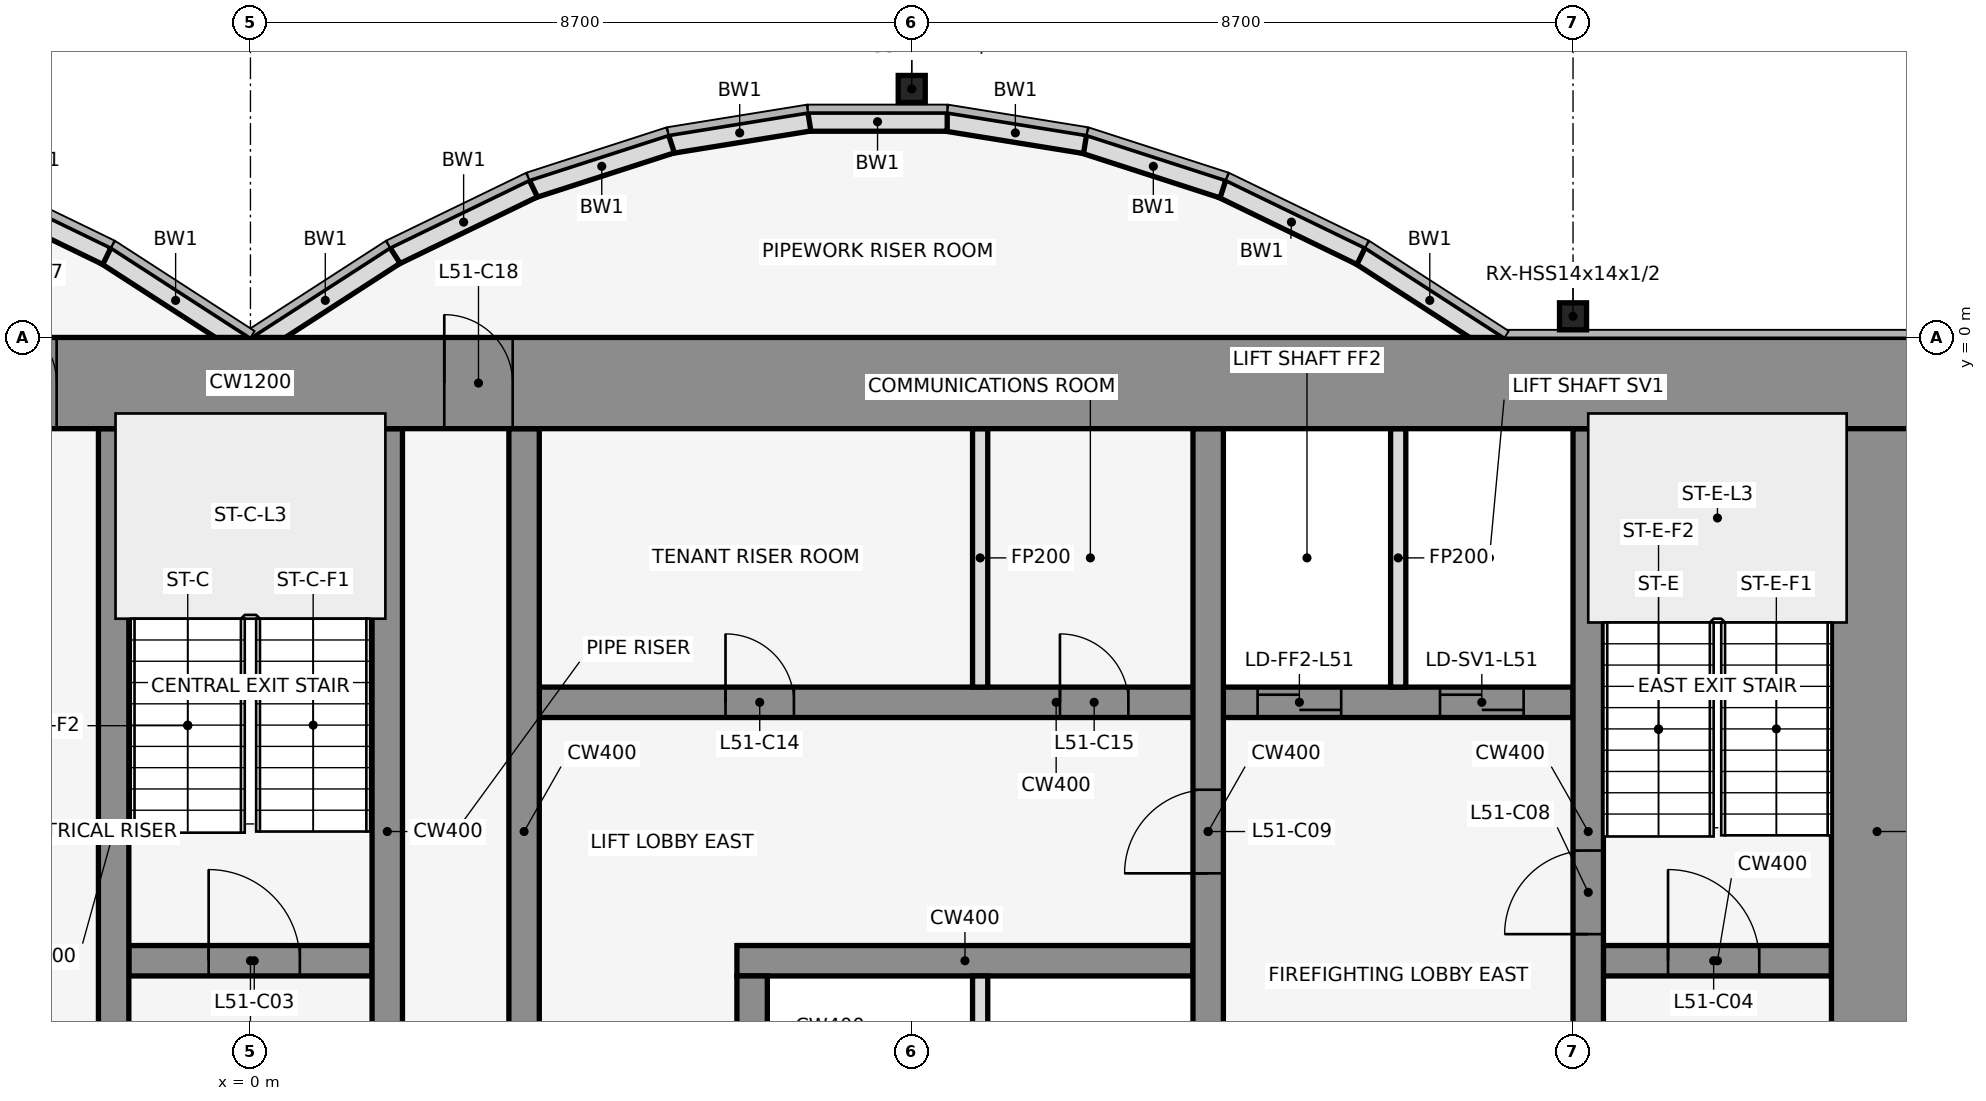
"""IFC4 building model, lengths in metres.
Left out: names, types, materials, properties, quantities, classifications, styles, units other than length and angle.
Written with IfcOpenShell. Run it as: python <this file> out.ifc"""

import sys

from ifc_helpers import new_model, si_unit, direction, frame, frame_2d, origin, origin_2d, place, context, subcontext, project, spatial, rectangle, hollow_rectangle, extrude, element, fill, save


model = new_model("IFC4")
c1 = context("Model", 3, precision=1e-05, world=origin(), true_north=direction((0.0, 1.0)))
c2 = subcontext(c1, "Body", "Model", "MODEL_VIEW")
j1 = project(units=[si_unit("LENGTHUNIT", "METRE"), si_unit("PLANEANGLEUNIT", "RADIAN")], contexts=[c1])
p1 = place(None, origin())
s1 = spatial("IfcSite", under=j1, at=p1, CompositionType="ELEMENT")
p2 = place(p1, origin())
s2 = spatial("IfcBuilding", under=s1, at=p2, CompositionType="ELEMENT")
p3 = place(p2, frame((0.0, 0.0, 227.8)))
s3 = spatial("IfcBuildingStorey", under=s2, at=p3, CompositionType="ELEMENT", Elevation=227.8)
for number, where, z_axis, x_axis in (
    (1, (8.7, 3.269, 0.0), (0.0, 0.0, 1.0), (1.0, 0.0, 0.0)),
    (2, (17.4, 0.278, 0.0), (0.0, 0.0, 1.0), (1.0, 0.0, 0.0)),
):
    element("IfcColumn", number, at=place(p3, frame(where, z_axis=z_axis, x_axis=x_axis)), inside=s3, PredefinedType="COLUMN", context=c2, shape_type="SweptSolid", body=[
        extrude(hollow_rectangle(XDim=0.356, YDim=0.356, WallThickness=0.012, at=origin_2d()), origin(), (0.0, 0.0, 1.0), 4.1),
    ])
p4 = place(p3, frame((16.432, -0.105, 0.0), z_axis=(0.0, 0.0, 1.0), x_axis=(-0.83981312244, 0.542875602121, 0.0)))
e3 = element("IfcWall", 3, at=p4, inside=s3, PredefinedType="STANDARD", context=c2, shape_type="SweptSolid", body=[
    extrude(rectangle(XDim=2.183, YDim=0.25, at=frame_2d((1.091, 0.0))), origin(), (0.0, 0.0, 1.0), 3.95),
])
p5 = place(p3, frame((14.612, 1.073, 0.0), z_axis=(0.0, 0.0, 1.0), x_axis=(-0.89982408427, 0.436252928206, 0.0)))
e4 = element("IfcWall", 4, at=p5, inside=s3, PredefinedType="STANDARD", context=c2, shape_type="SweptSolid", body=[
    extrude(rectangle(XDim=2.038, YDim=0.25, at=frame_2d((1.019, 0.0))), origin(), (0.0, 0.0, 1.0), 3.95),
])
p6 = place(p3, frame((12.795, 1.955, 0.0), z_axis=(0.0, 0.0, 1.0), x_axis=(-0.951495806175, 0.307661714928, 0.0)))
e5 = element("IfcWall", 5, at=p6, inside=s3, PredefinedType="STANDARD", context=c2, shape_type="SweptSolid", body=[
    extrude(rectangle(XDim=1.927, YDim=0.25, at=frame_2d((0.963, 0.0))), origin(), (0.0, 0.0, 1.0), 3.95),
])
p7 = place(p3, frame((10.98, 2.543, 0.0), z_axis=(0.0, 0.0, 1.0), x_axis=(-0.987181718931, 0.159600293885, 0.0)))
e6 = element("IfcWall", 6, at=p7, inside=s3, PredefinedType="STANDARD", context=c2, shape_type="SweptSolid", body=[
    extrude(rectangle(XDim=1.857, YDim=0.25, at=frame_2d((0.929, 0.0))), origin(), (0.0, 0.0, 1.0), 3.95),
])
p8 = place(p3, frame((9.167, 2.838, 0.0), z_axis=(0.0, 0.0, 1.0), x_axis=(-1.0, 0.0, 0.0)))
e7 = element("IfcWall", 7, at=p8, inside=s3, PredefinedType="STANDARD", context=c2, shape_type="SweptSolid", body=[
    extrude(rectangle(XDim=1.833, YDim=0.25, at=frame_2d((0.917, 0.0))), origin(), (0.0, 0.0, 1.0), 3.95),
])
p9 = place(p3, frame((7.353, 2.84, 0.0), z_axis=(0.0, 0.0, 1.0), x_axis=(-0.987181718931, -0.159600293885, 0.0)))
e8 = element("IfcWall", 8, at=p9, inside=s3, PredefinedType="STANDARD", context=c2, shape_type="SweptSolid", body=[
    extrude(rectangle(XDim=1.857, YDim=0.25, at=frame_2d((0.929, 0.0))), origin(), (0.0, 0.0, 1.0), 3.95),
])
p10 = place(p3, frame((5.538, 2.548, 0.0), z_axis=(0.0, 0.0, 1.0), x_axis=(-0.951495806175, -0.307661714928, 0.0)))
e9 = element("IfcWall", 9, at=p10, inside=s3, PredefinedType="STANDARD", context=c2, shape_type="SweptSolid", body=[
    extrude(rectangle(XDim=1.927, YDim=0.25, at=frame_2d((0.963, 0.0))), origin(), (0.0, 0.0, 1.0), 3.95),
])
p11 = place(p3, frame((3.721, 1.962, 0.0), z_axis=(0.0, 0.0, 1.0), x_axis=(-0.89982408427, -0.436252928206, 0.0)))
e10 = element("IfcWall", 10, at=p11, inside=s3, PredefinedType="STANDARD", context=c2, shape_type="SweptSolid", body=[
    extrude(rectangle(XDim=2.038, YDim=0.25, at=frame_2d((1.019, 0.0))), origin(), (0.0, 0.0, 1.0), 3.95),
])
for number, where, z_axis, x_axis in (
    (11, (1.901, 1.08, 0.0), (0.0, 0.0, 1.0), (-0.84, -0.543, 0.0)),
    (12, (-0.068, -0.105, 0.0), (0.0, 0.0, 1.0), (-0.84, 0.543, 0.0)),
):
    element("IfcWall", number, at=place(p3, frame(where, z_axis=z_axis, x_axis=x_axis)), inside=s3, PredefinedType="STANDARD", context=c2, shape_type="SweptSolid", body=[
        extrude(rectangle(XDim=2.183, YDim=0.25, at=frame_2d((1.091, 0.0))), origin(), (0.0, 0.0, 1.0), 3.95),
    ])
p12 = place(p3, frame((-1.888, 1.073, 0.0), z_axis=(0.0, 0.0, 1.0), x_axis=(-0.89982408427, 0.436252928206, 0.0)))
e13 = element("IfcWall", 13, at=p12, inside=s3, PredefinedType="STANDARD", context=c2, shape_type="SweptSolid", body=[
    extrude(rectangle(XDim=2.038, YDim=0.25, at=frame_2d((1.019, 0.0))), origin(), (0.0, 0.0, 1.0), 3.95),
])
p13 = place(p3, frame((-1.6, -8.2, 0.0), z_axis=(0.0, 0.0, 1.0), x_axis=(1.0, 0.0, 0.0)))
e14 = element("IfcWall", 14, at=p13, inside=s3, PredefinedType="SHEAR", context=c2, shape_type="SweptSolid", body=[
    extrude(rectangle(XDim=3.2, YDim=0.4, at=frame_2d((1.6, 0.0))), origin(), (0.0, 0.0, 1.0), 4.1),
])
p14 = place(p13, frame((1.05, 0.0, 0.0)))
e15 = element("IfcOpeningElement", 15, at=p14, cuts=e14, PredefinedType="OPENING", context=c2, shape_type="SweptSolid", body=[
    extrude(rectangle(XDim=1.2, YDim=2.1, at=frame_2d((0.6, 1.05))), frame((0.0, 0.212, 0.0), z_axis=(0.0, -1.0, 0.0), x_axis=(1.0, 0.0, 0.0)), (0.0, 0.0, 1.0), 0.424),
])
p15 = place(p3, frame((6.4, -8.2, 0.0), z_axis=(0.0, 0.0, 1.0), x_axis=(1.0, 0.0, 0.0)))
e16 = element("IfcWall", 16, at=p15, inside=s3, PredefinedType="SHEAR", context=c2, shape_type="SweptSolid", body=[
    extrude(rectangle(XDim=6.0, YDim=0.4, at=frame_2d((3.0, 0.0))), origin(), (0.0, 0.0, 1.0), 4.1),
])
p16 = place(p3, frame((17.8, -8.2, 0.0), z_axis=(0.0, 0.0, 1.0), x_axis=(1.0, 0.0, 0.0)))
e17 = element("IfcWall", 17, at=p16, inside=s3, PredefinedType="SHEAR", context=c2, shape_type="SweptSolid", body=[
    extrude(rectangle(XDim=3.0, YDim=0.4, at=frame_2d((1.5, 0.0))), origin(), (0.0, 0.0, 1.0), 4.1),
])
p17 = place(p16, frame((0.85, 0.0, 0.0)))
e18 = element("IfcOpeningElement", 18, at=p17, cuts=e17, PredefinedType="OPENING", context=c2, shape_type="SweptSolid", body=[
    extrude(rectangle(XDim=1.2, YDim=2.1, at=frame_2d((0.6, 1.05))), frame((0.0, 0.212, 0.0), z_axis=(0.0, -1.0, 0.0), x_axis=(1.0, 0.0, 0.0)), (0.0, 0.0, 1.0), 0.424),
])
p18 = place(p3, frame((3.8, -4.8, 0.0), z_axis=(0.0, 0.0, 1.0), x_axis=(1.0, 0.0, 0.0)))
e19 = element("IfcWall", 19, at=p18, inside=s3, PredefinedType="SHEAR", context=c2, shape_type="SweptSolid", body=[
    extrude(rectangle(XDim=13.6, YDim=0.4, at=frame_2d((6.8, 0.0))), origin(), (0.0, 0.0, 1.0), 4.1),
])
p19 = place(p18, frame((9.45, 0.0, 0.0)))
e20 = element("IfcOpeningElement", 20, at=p19, cuts=e19, PredefinedType="OPENING", context=c2, shape_type="SweptSolid", body=[
    extrude(rectangle(XDim=1.1, YDim=2.1, at=frame_2d((0.55, 1.05))), frame((0.0, 0.212, 0.0), z_axis=(0.0, -1.0, 0.0), x_axis=(1.0, 0.0, 0.0)), (0.0, 0.0, 1.0), 0.424),
])
p20 = place(p18, frame((11.85, 0.0, 0.0)))
e21 = element("IfcOpeningElement", 21, at=p20, cuts=e19, PredefinedType="OPENING", context=c2, shape_type="SweptSolid", body=[
    extrude(rectangle(XDim=1.1, YDim=2.1, at=frame_2d((0.55, 1.05))), frame((0.0, 0.212, 0.0), z_axis=(0.0, -1.0, 0.0), x_axis=(1.0, 0.0, 0.0)), (0.0, 0.0, 1.0), 0.424),
])
p21 = place(p18, frame((2.45, 0.0, 0.0)))
e22 = element("IfcOpeningElement", 22, at=p21, cuts=e19, PredefinedType="OPENING", context=c2, shape_type="SweptSolid", body=[
    extrude(rectangle(XDim=0.9, YDim=2.1, at=frame_2d((0.45, 1.05))), frame((0.0, 0.212, 0.0), z_axis=(0.0, -1.0, 0.0), x_axis=(1.0, 0.0, 0.0)), (0.0, 0.0, 1.0), 0.424),
])
p22 = place(p18, frame((6.85, 0.0, 0.0)))
e23 = element("IfcOpeningElement", 23, at=p22, cuts=e19, PredefinedType="OPENING", context=c2, shape_type="SweptSolid", body=[
    extrude(rectangle(XDim=0.9, YDim=2.1, at=frame_2d((0.45, 1.05))), frame((0.0, 0.212, 0.0), z_axis=(0.0, -1.0, 0.0), x_axis=(1.0, 0.0, 0.0)), (0.0, 0.0, 1.0), 0.424),
])
for number, where, z_axis, x_axis in (
    (24, (-1.8, -11.8, 0.0), (0.0, 0.0, 1.0), (0.0, 1.0, 0.0)),
    (25, (1.8, -11.8, 0.0), (0.0, 0.0, 1.0), (0.0, 1.0, 0.0)),
):
    element("IfcWall", number, at=place(p3, frame(where, z_axis=z_axis, x_axis=x_axis)), inside=s3, PredefinedType="SHEAR", context=c2, shape_type="SweptSolid", body=[
        extrude(rectangle(XDim=10.6, YDim=0.4, at=frame_2d((5.3, 0.0))), origin(), (0.0, 0.0, 1.0), 4.1),
    ])
p23 = place(p3, frame((3.6, -11.8, 0.0), z_axis=(0.0, 0.0, 1.0), x_axis=(0.0, 1.0, 0.0)))
e26 = element("IfcWall", 26, at=p23, inside=s3, PredefinedType="SHEAR", context=c2, shape_type="SweptSolid", body=[
    extrude(rectangle(XDim=10.6, YDim=0.4, at=frame_2d((5.3, 0.0))), origin(), (0.0, 0.0, 1.0), 4.1),
])
p24 = place(p23, frame((1.35, 0.0, 0.0)))
e27 = element("IfcOpeningElement", 27, at=p24, cuts=e26, PredefinedType="OPENING", context=c2, shape_type="SweptSolid", body=[
    extrude(rectangle(XDim=0.9, YDim=2.1, at=frame_2d((0.45, 1.05))), frame((0.0, 0.212, 0.0), z_axis=(0.0, -1.0, 0.0), x_axis=(1.0, 0.0, 0.0)), (0.0, 0.0, 1.0), 0.424),
])
p25 = place(p3, frame((6.6, -11.8, 0.0), z_axis=(0.0, 0.0, 1.0), x_axis=(0.0, 1.0, 0.0)))
e28 = element("IfcWall", 28, at=p25, inside=s3, PredefinedType="SHEAR", context=c2, shape_type="SweptSolid", body=[
    extrude(rectangle(XDim=3.4, YDim=0.4, at=frame_2d((1.7, 0.0))), origin(), (0.0, 0.0, 1.0), 4.1),
])
for number, where, z_axis, x_axis in (
    (29, (9.6, -11.8, 0.0), (0.0, 0.0, 1.0), (0.0, 1.0, 0.0)),
    (30, (9.6, -4.6, 0.0), (0.0, 0.0, 1.0), (0.0, 1.0, 0.0)),
):
    element("IfcWall", number, at=place(p3, frame(where, z_axis=z_axis, x_axis=x_axis)), inside=s3, PredefinedType="PARTITIONING", context=c2, shape_type="SweptSolid", body=[
        extrude(rectangle(XDim=3.4, YDim=0.2, at=frame_2d((1.7, 0.0))), origin(), (0.0, 0.0, 1.0), 2.84),
    ])
p26 = place(p3, frame((12.6, -11.8, 0.0), z_axis=(0.0, 0.0, 1.0), x_axis=(0.0, 1.0, 0.0)))
e31 = element("IfcWall", 31, at=p26, inside=s3, PredefinedType="SHEAR", context=c2, shape_type="SweptSolid", body=[
    extrude(rectangle(XDim=10.6, YDim=0.4, at=frame_2d((5.3, 0.0))), origin(), (0.0, 0.0, 1.0), 4.1),
])
p27 = place(p26, frame((1.25, 0.0, 0.0)))
e32 = element("IfcOpeningElement", 32, at=p27, cuts=e31, PredefinedType="OPENING", context=c2, shape_type="SweptSolid", body=[
    extrude(rectangle(XDim=1.2, YDim=2.1, at=frame_2d((0.6, 1.05))), frame((0.0, 0.212, 0.0), z_axis=(0.0, -1.0, 0.0), x_axis=(1.0, 0.0, 0.0)), (0.0, 0.0, 1.0), 0.424),
])
p28 = place(p26, frame((4.75, 0.0, 0.0)))
e33 = element("IfcOpeningElement", 33, at=p28, cuts=e31, PredefinedType="OPENING", context=c2, shape_type="SweptSolid", body=[
    extrude(rectangle(XDim=1.1, YDim=2.1, at=frame_2d((0.55, 1.05))), frame((0.0, 0.212, 0.0), z_axis=(0.0, -1.0, 0.0), x_axis=(1.0, 0.0, 0.0)), (0.0, 0.0, 1.0), 0.424),
])
p29 = place(p3, frame((15.1, -4.6, 0.0), z_axis=(0.0, 0.0, 1.0), x_axis=(0.0, 1.0, 0.0)))
e34 = element("IfcWall", 34, at=p29, inside=s3, PredefinedType="PARTITIONING", context=c2, shape_type="SweptSolid", body=[
    extrude(rectangle(XDim=3.4, YDim=0.2, at=frame_2d((1.7, 0.0))), origin(), (0.0, 0.0, 1.0), 2.84),
])
p30 = place(p3, frame((17.6, -11.8, 0.0), z_axis=(0.0, 0.0, 1.0), x_axis=(0.0, 1.0, 0.0)))
e35 = element("IfcWall", 35, at=p30, inside=s3, PredefinedType="SHEAR", context=c2, shape_type="SweptSolid", body=[
    extrude(rectangle(XDim=10.6, YDim=0.4, at=frame_2d((5.3, 0.0))), origin(), (0.0, 0.0, 1.0), 4.1),
])
p31 = place(p30, frame((1.25, 0.0, 0.0)))
e36 = element("IfcOpeningElement", 36, at=p31, cuts=e35, PredefinedType="OPENING", context=c2, shape_type="SweptSolid", body=[
    extrude(rectangle(XDim=1.1, YDim=2.1, at=frame_2d((0.55, 1.05))), frame((0.0, 0.212, 0.0), z_axis=(0.0, -1.0, 0.0), x_axis=(1.0, 0.0, 0.0)), (0.0, 0.0, 1.0), 0.424),
])
p32 = place(p30, frame((3.95, 0.0, 0.0)))
e37 = element("IfcOpeningElement", 37, at=p32, cuts=e35, PredefinedType="OPENING", context=c2, shape_type="SweptSolid", body=[
    extrude(rectangle(XDim=1.1, YDim=2.1, at=frame_2d((0.55, 1.05))), frame((0.0, 0.212, 0.0), z_axis=(0.0, -1.0, 0.0), x_axis=(1.0, 0.0, 0.0)), (0.0, 0.0, 1.0), 0.424),
])
p33 = place(p3, frame((-22.0, -0.6, 0.0), z_axis=(0.0, 0.0, 1.0), x_axis=(1.0, 0.0, 0.0)))
e38 = element("IfcWall", 38, at=p33, inside=s3, PredefinedType="SHEAR", context=c2, shape_type="SweptSolid", body=[
    extrude(rectangle(XDim=44.0, YDim=1.2, at=frame_2d((22.0, 0.0))), origin(), (0.0, 0.0, 1.0), 4.1),
])
p34 = place(p33, frame((18.55, 0.0, 0.0)))
e39 = element("IfcOpeningElement", 39, at=p34, cuts=e38, PredefinedType="OPENING", context=c2, shape_type="SweptSolid", body=[
    extrude(rectangle(XDim=0.9, YDim=2.1, at=frame_2d((0.45, 1.05))), frame((0.0, 0.612, 0.0), z_axis=(0.0, -1.0, 0.0), x_axis=(1.0, 0.0, 0.0)), (0.0, 0.0, 1.0), 1.224),
])
p35 = place(p33, frame((24.55, 0.0, 0.0)))
e40 = element("IfcOpeningElement", 40, at=p35, cuts=e38, PredefinedType="OPENING", context=c2, shape_type="SweptSolid", body=[
    extrude(rectangle(XDim=0.9, YDim=2.1, at=frame_2d((0.45, 1.05))), frame((0.0, 0.612, 0.0), z_axis=(0.0, -1.0, 0.0), x_axis=(1.0, 0.0, 0.0)), (0.0, 0.0, 1.0), 1.224),
])
p36 = place(p3, frame((21.4, -11.8, 0.0), z_axis=(0.0, 0.0, 1.0), x_axis=(0.0, 1.0, 0.0)))
e41 = element("IfcWall", 41, at=p36, inside=s3, PredefinedType="SHEAR", context=c2, shape_type="SweptSolid", body=[
    extrude(rectangle(XDim=10.6, YDim=1.2, at=frame_2d((5.3, 0.0))), origin(), (0.0, 0.0, 1.0), 4.1),
])
p37 = place(p14, origin())
e42 = element("IfcDoor", 42, at=p37, inside=s3, OperationType="SINGLE_SWING_LEFT", PredefinedType="DOOR", context=c2, shape_type="SweptSolid", body=[
    extrude(rectangle(XDim=1.2, YDim=2.1, at=frame_2d((0.6, 1.05))), frame((0.0, 0.025, 0.0), z_axis=(0.0, -1.0, 0.0), x_axis=(1.0, 0.0, 0.0)), (0.0, 0.0, 1.0), 0.05),
])
fill(e15, e42)
p38 = place(p17, origin())
e43 = element("IfcDoor", 43, at=p38, inside=s3, OperationType="SINGLE_SWING_RIGHT", PredefinedType="DOOR", context=c2, shape_type="SweptSolid", body=[
    extrude(rectangle(XDim=1.2, YDim=2.1, at=frame_2d((0.6, 1.05))), frame((0.0, 0.025, 0.0), z_axis=(0.0, -1.0, 0.0), x_axis=(1.0, 0.0, 0.0)), (0.0, 0.0, 1.0), 0.05),
])
fill(e18, e43)
p39 = place(p19, origin())
e44 = element("IfcDoor", 44, at=p39, inside=s3, OperationType="DOUBLE_DOOR_SLIDING", PredefinedType="DOOR", context=c2, shape_type="SweptSolid", body=[
    extrude(rectangle(XDim=1.1, YDim=2.1, at=frame_2d((0.55, 1.05))), frame((0.0, 0.025, 0.0), z_axis=(0.0, -1.0, 0.0), x_axis=(1.0, 0.0, 0.0)), (0.0, 0.0, 1.0), 0.05),
])
fill(e20, e44)
p40 = place(p20, origin())
e45 = element("IfcDoor", 45, at=p40, inside=s3, OperationType="DOUBLE_DOOR_SLIDING", PredefinedType="DOOR", context=c2, shape_type="SweptSolid", body=[
    extrude(rectangle(XDim=1.1, YDim=2.1, at=frame_2d((0.55, 1.05))), frame((0.0, 0.025, 0.0), z_axis=(0.0, -1.0, 0.0), x_axis=(1.0, 0.0, 0.0)), (0.0, 0.0, 1.0), 0.05),
])
fill(e21, e45)
p41 = place(p32, origin())
e46 = element("IfcDoor", 46, at=p41, inside=s3, OperationType="SINGLE_SWING_RIGHT", PredefinedType="DOOR", context=c2, shape_type="SweptSolid", body=[
    extrude(rectangle(XDim=1.1, YDim=2.1, at=frame_2d((0.55, 1.05))), frame((0.0, 0.025, 0.0), z_axis=(0.0, -1.0, 0.0), x_axis=(1.0, 0.0, 0.0)), (0.0, 0.0, 1.0), 0.05),
])
fill(e37, e46)
p42 = place(p28, frame((1.1, 0.0, 0.0), z_axis=(0.0, 0.0, 1.0), x_axis=(-1.0, 0.0, 0.0)))
e47 = element("IfcDoor", 47, at=p42, inside=s3, OperationType="SINGLE_SWING_RIGHT", PredefinedType="DOOR", context=c2, shape_type="SweptSolid", body=[
    extrude(rectangle(XDim=1.1, YDim=2.1, at=frame_2d((0.55, 1.05))), frame((0.0, 0.025, 0.0), z_axis=(0.0, -1.0, 0.0), x_axis=(1.0, 0.0, 0.0)), (0.0, 0.0, 1.0), 0.05),
])
fill(e33, e47)
p43 = place(p21, origin())
e48 = element("IfcDoor", 48, at=p43, inside=s3, OperationType="SINGLE_SWING_RIGHT", PredefinedType="DOOR", context=c2, shape_type="SweptSolid", body=[
    extrude(rectangle(XDim=0.9, YDim=2.1, at=frame_2d((0.45, 1.05))), frame((0.0, 0.025, 0.0), z_axis=(0.0, -1.0, 0.0), x_axis=(1.0, 0.0, 0.0)), (0.0, 0.0, 1.0), 0.05),
])
fill(e22, e48)
p44 = place(p22, origin())
e49 = element("IfcDoor", 49, at=p44, inside=s3, OperationType="SINGLE_SWING_LEFT", PredefinedType="DOOR", context=c2, shape_type="SweptSolid", body=[
    extrude(rectangle(XDim=0.9, YDim=2.1, at=frame_2d((0.45, 1.05))), frame((0.0, 0.025, 0.0), z_axis=(0.0, -1.0, 0.0), x_axis=(1.0, 0.0, 0.0)), (0.0, 0.0, 1.0), 0.05),
])
fill(e23, e49)
p45 = place(p34, origin())
e50 = element("IfcDoor", 50, at=p45, inside=s3, OperationType="SINGLE_SWING_LEFT", PredefinedType="DOOR", context=c2, shape_type="SweptSolid", body=[
    extrude(rectangle(XDim=0.9, YDim=2.1, at=frame_2d((0.45, 1.05))), frame((0.0, 0.025, 0.0), z_axis=(0.0, -1.0, 0.0), x_axis=(1.0, 0.0, 0.0)), (0.0, 0.0, 1.0), 0.05),
])
fill(e39, e50)
p46 = place(p35, origin())
e51 = element("IfcDoor", 51, at=p46, inside=s3, OperationType="SINGLE_SWING_LEFT", PredefinedType="DOOR", context=c2, shape_type="SweptSolid", body=[
    extrude(rectangle(XDim=0.9, YDim=2.1, at=frame_2d((0.45, 1.05))), frame((0.0, 0.025, 0.0), z_axis=(0.0, -1.0, 0.0), x_axis=(1.0, 0.0, 0.0)), (0.0, 0.0, 1.0), 0.05),
])
fill(e40, e51)
save(model, sys.argv[1])
